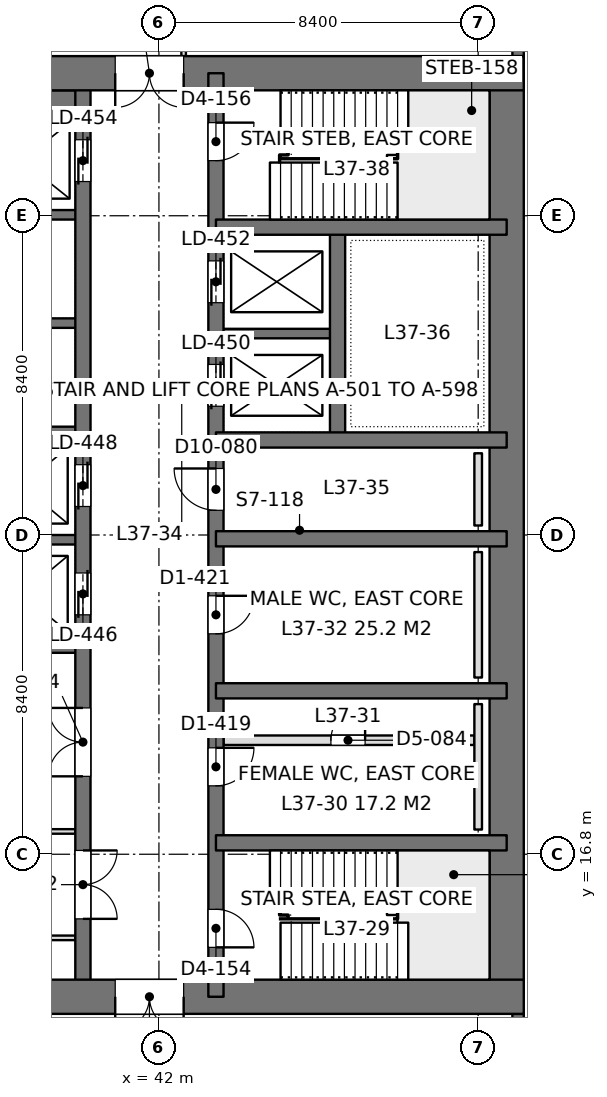
"""IFC4 building model, lengths in metres.
Left out: names, types, materials, properties, quantities, classifications, styles, units other than length and angle.
Written with IfcOpenShell. Run it as: python <this file> out.ifc"""

import sys

from ifc_helpers import new_model, si_unit, direction, frame, frame_2d, origin, place, context, subcontext, project, spatial, rectangle, extrude, element, fill, save


model = new_model("IFC4")
c1 = context("Model", 3, precision=1e-05, world=origin(), true_north=direction((0.0, 1.0)))
c2 = subcontext(c1, "Body", "Model", "MODEL_VIEW")
j1 = project(units=[si_unit("LENGTHUNIT", "METRE"), si_unit("PLANEANGLEUNIT", "RADIAN")], contexts=[c1])
p1 = place(None, origin())
s1 = spatial("IfcSite", under=j1, at=p1, CompositionType="ELEMENT")
p2 = place(p1, origin())
s2 = spatial("IfcBuilding", under=s1, at=p2, CompositionType="ELEMENT")
p3 = place(p2, frame((0.0, 0.0, 163.8)))
s3 = spatial("IfcBuildingStorey", under=s2, at=p3, CompositionType="ELEMENT", Elevation=163.8)
p4 = place(p3, frame((33.6, 13.05, 0.0), z_axis=(0.0, 0.0, 1.0), x_axis=(1.0, 0.0, 0.0)))
e1 = element("IfcWall", 1, at=p4, inside=s3, PredefinedType="SHEAR", context=c2, shape_type="SweptSolid", body=[
    extrude(rectangle(XDim=18.0, YDim=0.9, at=frame_2d((9.0, 0.0))), origin(), (0.0, 0.0, 1.0), 4.2),
])
p5 = place(p4, frame((7.25, 0.0, 0.0)))
e2 = element("IfcOpeningElement", 2, at=p5, cuts=e1, PredefinedType="OPENING", context=c2, shape_type="SweptSolid", body=[
    extrude(rectangle(XDim=1.8, YDim=2.4, at=frame_2d((0.9, 1.2))), frame((0.0, 0.46, 0.0), z_axis=(0.0, -1.0, 0.0), x_axis=(1.0, 0.0, 0.0)), (0.0, 0.0, 1.0), 0.92),
])
p6 = place(p3, frame((33.6, 37.35, 0.0), z_axis=(0.0, 0.0, 1.0), x_axis=(1.0, 0.0, 0.0)))
e3 = element("IfcWall", 3, at=p6, inside=s3, PredefinedType="SHEAR", context=c2, shape_type="SweptSolid", body=[
    extrude(rectangle(XDim=18.0, YDim=0.9, at=frame_2d((9.0, 0.0))), origin(), (0.0, 0.0, 1.0), 4.2),
])
p7 = place(p6, frame((7.25, 0.0, 0.0)))
e4 = element("IfcOpeningElement", 4, at=p7, cuts=e3, PredefinedType="OPENING", context=c2, shape_type="SweptSolid", body=[
    extrude(rectangle(XDim=1.8, YDim=2.4, at=frame_2d((0.9, 1.2))), frame((0.0, 0.46, 0.0), z_axis=(0.0, -1.0, 0.0), x_axis=(1.0, 0.0, 0.0)), (0.0, 0.0, 1.0), 0.92),
])
p8 = place(p3, frame((51.15, 13.05, 0.0), z_axis=(0.0, 0.0, 1.0), x_axis=(0.0, 1.0, 0.0)))
e5 = element("IfcWall", 5, at=p8, inside=s3, PredefinedType="SHEAR", context=c2, shape_type="SweptSolid", body=[
    extrude(rectangle(XDim=24.3, YDim=0.9, at=frame_2d((12.15, 0.0))), origin(), (0.0, 0.0, 1.0), 4.2),
])
p9 = place(p3, frame((43.5, 13.05, 0.0), z_axis=(0.0, 0.0, 1.0), x_axis=(0.0, 1.0, 0.0)))
e6 = element("IfcWall", 6, at=p9, inside=s3, PredefinedType="SHEAR", context=c2, shape_type="SweptSolid", body=[
    extrude(rectangle(XDim=24.3, YDim=0.4, at=frame_2d((12.15, 0.0))), origin(), (0.0, 0.0, 1.0), 4.2),
])
p10 = place(p9, frame((1.3, 0.0, 0.0)))
e7 = element("IfcOpeningElement", 7, at=p10, cuts=e6, PredefinedType="OPENING", context=c2, shape_type="SweptSolid", body=[
    extrude(rectangle(XDim=1.0, YDim=2.2, at=frame_2d((0.5, 1.1))), frame((0.0, 0.21, 0.0), z_axis=(0.0, -1.0, 0.0), x_axis=(1.0, 0.0, 0.0)), (0.0, 0.0, 1.0), 0.42),
])
p11 = place(p9, frame((22.0, 0.0, 0.0)))
e8 = element("IfcOpeningElement", 8, at=p11, cuts=e6, PredefinedType="OPENING", context=c2, shape_type="SweptSolid", body=[
    extrude(rectangle(XDim=1.0, YDim=2.2, at=frame_2d((0.5, 1.1))), frame((0.0, 0.21, 0.0), z_axis=(0.0, -1.0, 0.0), x_axis=(1.0, 0.0, 0.0)), (0.0, 0.0, 1.0), 0.42),
])
p12 = place(p9, frame((5.55, 0.0, 0.0)))
e9 = element("IfcOpeningElement", 9, at=p12, cuts=e6, PredefinedType="OPENING", context=c2, shape_type="SweptSolid", body=[
    extrude(rectangle(XDim=1.0, YDim=2.2, at=frame_2d((0.5, 1.1))), frame((0.0, 0.21, 0.0), z_axis=(0.0, -1.0, 0.0), x_axis=(1.0, 0.0, 0.0)), (0.0, 0.0, 1.0), 0.42),
])
p13 = place(p9, frame((9.55, 0.0, 0.0)))
e10 = element("IfcOpeningElement", 10, at=p13, cuts=e6, PredefinedType="OPENING", context=c2, shape_type="SweptSolid", body=[
    extrude(rectangle(XDim=1.0, YDim=2.2, at=frame_2d((0.5, 1.1))), frame((0.0, 0.21, 0.0), z_axis=(0.0, -1.0, 0.0), x_axis=(1.0, 0.0, 0.0)), (0.0, 0.0, 1.0), 0.42),
])
p14 = place(p9, frame((12.8, 0.0, 0.0)))
e11 = element("IfcOpeningElement", 11, at=p14, cuts=e6, PredefinedType="OPENING", context=c2, shape_type="SweptSolid", body=[
    extrude(rectangle(XDim=1.1, YDim=2.2, at=frame_2d((0.55, 1.1))), frame((0.0, 0.21, 0.0), z_axis=(0.0, -1.0, 0.0), x_axis=(1.0, 0.0, 0.0)), (0.0, 0.0, 1.0), 0.42),
])
p15 = place(p9, frame((15.538, 0.0, 0.0)))
e12 = element("IfcOpeningElement", 12, at=p15, cuts=e6, PredefinedType="OPENING", context=c2, shape_type="SweptSolid", body=[
    extrude(rectangle(XDim=1.1, YDim=2.2, at=frame_2d((0.55, 1.1))), frame((0.0, 0.21, 0.0), z_axis=(0.0, -1.0, 0.0), x_axis=(1.0, 0.0, 0.0)), (0.0, 0.0, 1.0), 0.42),
])
p16 = place(p9, frame((18.262, 0.0, 0.0)))
e13 = element("IfcOpeningElement", 13, at=p16, cuts=e6, PredefinedType="OPENING", context=c2, shape_type="SweptSolid", body=[
    extrude(rectangle(XDim=1.1, YDim=2.2, at=frame_2d((0.55, 1.1))), frame((0.0, 0.21, 0.0), z_axis=(0.0, -1.0, 0.0), x_axis=(1.0, 0.0, 0.0)), (0.0, 0.0, 1.0), 0.42),
])
p17 = place(p3, frame((40.0, 13.05, 0.0), z_axis=(0.0, 0.0, 1.0), x_axis=(0.0, 1.0, 0.0)))
e14 = element("IfcWall", 14, at=p17, inside=s3, PredefinedType="SHEAR", context=c2, shape_type="SweptSolid", body=[
    extrude(rectangle(XDim=24.3, YDim=0.4, at=frame_2d((12.15, 0.0))), origin(), (0.0, 0.0, 1.0), 4.2),
])
p18 = place(p17, frame((10.05, 0.0, 0.0)))
e15 = element("IfcOpeningElement", 15, at=p18, cuts=e14, PredefinedType="OPENING", context=c2, shape_type="SweptSolid", body=[
    extrude(rectangle(XDim=1.1, YDim=2.2, at=frame_2d((0.55, 1.1))), frame((0.0, 0.21, 0.0), z_axis=(0.0, -1.0, 0.0), x_axis=(1.0, 0.0, 0.0)), (0.0, 0.0, 1.0), 0.42),
])
p19 = place(p17, frame((12.9, 0.0, 0.0)))
e16 = element("IfcOpeningElement", 16, at=p19, cuts=e14, PredefinedType="OPENING", context=c2, shape_type="SweptSolid", body=[
    extrude(rectangle(XDim=1.1, YDim=2.2, at=frame_2d((0.55, 1.1))), frame((0.0, 0.21, 0.0), z_axis=(0.0, -1.0, 0.0), x_axis=(1.0, 0.0, 0.0)), (0.0, 0.0, 1.0), 0.42),
])
p20 = place(p17, frame((21.45, 0.0, 0.0)))
e17 = element("IfcOpeningElement", 17, at=p20, cuts=e14, PredefinedType="OPENING", context=c2, shape_type="SweptSolid", body=[
    extrude(rectangle(XDim=1.1, YDim=2.2, at=frame_2d((0.55, 1.1))), frame((0.0, 0.21, 0.0), z_axis=(0.0, -1.0, 0.0), x_axis=(1.0, 0.0, 0.0)), (0.0, 0.0, 1.0), 0.42),
])
p21 = place(p17, frame((2.05, 0.0, 0.0)))
e18 = element("IfcOpeningElement", 18, at=p21, cuts=e14, PredefinedType="OPENING", context=c2, shape_type="SweptSolid", body=[
    extrude(rectangle(XDim=1.8, YDim=2.4, at=frame_2d((0.9, 1.2))), frame((0.0, 0.21, 0.0), z_axis=(0.0, -1.0, 0.0), x_axis=(1.0, 0.0, 0.0)), (0.0, 0.0, 1.0), 0.42),
])
p22 = place(p17, frame((5.8, 0.0, 0.0)))
e19 = element("IfcOpeningElement", 19, at=p22, cuts=e14, PredefinedType="OPENING", context=c2, shape_type="SweptSolid", body=[
    extrude(rectangle(XDim=1.8, YDim=2.4, at=frame_2d((0.9, 1.2))), frame((0.0, 0.21, 0.0), z_axis=(0.0, -1.0, 0.0), x_axis=(1.0, 0.0, 0.0)), (0.0, 0.0, 1.0), 0.42),
])
for number, where, z_axis, x_axis in (
    (20, (51.15, 17.1, 0.0), (0.0, 0.0, 1.0), (-1.0, 0.0, 0.0)),
    (21, (51.15, 21.1, 0.0), (0.0, 0.0, 1.0), (-1.0, 0.0, 0.0)),
    (22, (51.15, 25.1, 0.0), (0.0, 0.0, 1.0), (-1.0, 0.0, 0.0)),
    (23, (51.15, 27.7, 0.0), (0.0, 0.0, 1.0), (-1.0, 0.0, 0.0)),
    (24, (51.15, 33.3, 0.0), (0.0, 0.0, 1.0), (-1.0, 0.0, 0.0)),
):
    element("IfcWall", number, at=place(p3, frame(where, z_axis=z_axis, x_axis=x_axis)), inside=s3, PredefinedType="SHEAR", context=c2, shape_type="SweptSolid", body=[
        extrude(rectangle(XDim=7.65, YDim=0.4, at=frame_2d((3.825, 0.0))), origin(), (0.0, 0.0, 1.0), 4.2),
    ])
p23 = place(p3, frame((46.7, 27.7, 0.0), z_axis=(0.0, 0.0, 1.0), x_axis=(0.0, 1.0, 0.0)))
e25 = element("IfcWall", 25, at=p23, inside=s3, PredefinedType="SHEAR", context=c2, shape_type="SweptSolid", body=[
    extrude(rectangle(XDim=5.6, YDim=0.4, at=frame_2d((2.8, 0.0))), origin(), (0.0, 0.0, 1.0), 4.2),
])
p24 = place(p3, frame((46.7, 30.5, 0.0), z_axis=(0.0, 0.0, 1.0), x_axis=(-1.0, 0.0, 0.0)))
e26 = element("IfcWall", 26, at=p24, inside=s3, PredefinedType="SHEAR", context=c2, shape_type="SweptSolid", body=[
    extrude(rectangle(XDim=3.2, YDim=0.25, at=frame_2d((1.6, 0.0))), origin(), (0.0, 0.0, 1.0), 4.2),
])
p25 = place(p3, frame((40.0, 22.225, 0.0), z_axis=(0.0, 0.0, 1.0), x_axis=(-1.0, 0.0, 0.0)))
e27 = element("IfcWall", 27, at=p25, inside=s3, PredefinedType="SHEAR", context=c2, shape_type="SweptSolid", body=[
    extrude(rectangle(XDim=5.95, YDim=0.25, at=frame_2d((2.975, 0.0))), origin(), (0.0, 0.0, 1.0), 4.2),
])
for number, where, z_axis, x_axis in (
    (28, (40.0, 25.075, 0.0), (0.0, 0.0, 1.0), (-1.0, 0.0, 0.0)),
    (29, (40.0, 27.925, 0.0), (0.0, 0.0, 1.0), (-1.0, 0.0, 0.0)),
    (30, (40.0, 30.775, 0.0), (0.0, 0.0, 1.0), (-1.0, 0.0, 0.0)),
    (31, (40.0, 33.625, 0.0), (0.0, 0.0, 1.0), (-1.0, 0.0, 0.0)),
):
    element("IfcWall", number, at=place(p3, frame(where, z_axis=z_axis, x_axis=x_axis)), inside=s3, PredefinedType="SHEAR", context=c2, shape_type="SweptSolid", body=[
        extrude(rectangle(XDim=3.2, YDim=0.25, at=frame_2d((1.6, 0.0))), origin(), (0.0, 0.0, 1.0), 4.2),
    ])
p26 = place(p3, frame((40.0, 36.625, 0.0), z_axis=(0.0, 0.0, 1.0), x_axis=(-1.0, 0.0, 0.0)))
e32 = element("IfcWall", 32, at=p26, inside=s3, PredefinedType="SHEAR", context=c2, shape_type="SweptSolid", body=[
    extrude(rectangle(XDim=3.2, YDim=0.55, at=frame_2d((1.6, 0.0))), origin(), (0.0, 0.0, 1.0), 4.2),
])
p27 = place(p3, frame((51.45, 42.0, 0.0), z_axis=(0.0, 0.0, 1.0), x_axis=(0.0, -1.0, 0.0)))
e33 = element("IfcWall", 33, at=p27, inside=s3, PredefinedType="SOLIDWALL", context=c2, shape_type="SweptSolid", body=[
    extrude(rectangle(XDim=4.2, YDim=0.3, at=frame_2d((2.1, 0.0))), origin(), (0.0, 0.0, 1.0), 4.0),
])
p28 = place(p27, frame((0.9, 0.0, 0.9)))
e34 = element("IfcOpeningElement", 34, at=p28, cuts=e33, PredefinedType="OPENING", context=c2, shape_type="SweptSolid", body=[
    extrude(rectangle(XDim=2.4, YDim=1.9, at=frame_2d((1.2, 0.95))), frame((0.0, 0.16, 0.0), z_axis=(0.0, -1.0, 0.0), x_axis=(1.0, 0.0, 0.0)), (0.0, 0.0, 1.0), 0.32),
])
p29 = place(p3, frame((51.45, 12.6, 0.0), z_axis=(0.0, 0.0, 1.0), x_axis=(0.0, -1.0, 0.0)))
e35 = element("IfcWall", 35, at=p29, inside=s3, PredefinedType="SOLIDWALL", context=c2, shape_type="SweptSolid", body=[
    extrude(rectangle(XDim=4.2, YDim=0.3, at=frame_2d((2.1, 0.0))), origin(), (0.0, 0.0, 1.0), 4.0),
])
p30 = place(p29, frame((0.9, 0.0, 0.9)))
e36 = element("IfcOpeningElement", 36, at=p30, cuts=e35, PredefinedType="OPENING", context=c2, shape_type="SweptSolid", body=[
    extrude(rectangle(XDim=2.4, YDim=1.9, at=frame_2d((1.2, 0.95))), frame((0.0, 0.16, 0.0), z_axis=(0.0, -1.0, 0.0), x_axis=(1.0, 0.0, 0.0)), (0.0, 0.0, 1.0), 0.32),
])
p31 = place(p3, frame((33.898, 17.4, 0.0), z_axis=(0.0, 0.0, 1.0), x_axis=(1.0, 0.0, 0.0)))
e37 = element("IfcWall", 37, at=p31, inside=s3, PredefinedType="PARTITIONING", context=c2, shape_type="SweptSolid", body=[
    extrude(rectangle(XDim=5.904, YDim=0.12, at=frame_2d((2.952, 0.0))), origin(), (0.0, 0.0, 1.0), 3.3),
])
p32 = place(p31, frame((0.752, 0.0, 0.0)))
e38 = element("IfcOpeningElement", 38, at=p32, cuts=e37, PredefinedType="OPENING", context=c2, shape_type="SweptSolid", body=[
    extrude(rectangle(XDim=1.0, YDim=2.4, at=frame_2d((0.5, 1.2))), frame((0.0, 0.07, 0.0), z_axis=(0.0, -1.0, 0.0), x_axis=(1.0, 0.0, 0.0)), (0.0, 0.0, 1.0), 0.14),
])
p33 = place(p3, frame((33.598, 14.6, 0.0), z_axis=(0.0, 0.0, 1.0), x_axis=(1.0, 0.0, 0.0)))
e39 = element("IfcWall", 39, at=p33, inside=s3, PredefinedType="PARTITIONING", context=c2, shape_type="SweptSolid", body=[
    extrude(rectangle(XDim=6.204, YDim=0.12, at=frame_2d((3.102, 0.0))), origin(), (0.0, 0.0, 1.0), 3.3),
])
p34 = place(p3, frame((42.65, 37.8, 0.0), z_axis=(0.0, 0.0, 1.0), x_axis=(0.0, 1.0, 0.0)))
e40 = element("IfcWall", 40, at=p34, inside=s3, PredefinedType="PARTITIONING", context=c2, shape_type="SweptSolid", body=[
    extrude(rectangle(XDim=2.0, YDim=0.12, at=frame_2d((1.0, 0.0))), origin(), (0.0, 0.0, 1.0), 4.0),
])
p35 = place(p3, frame((43.7, 19.8, 0.0), z_axis=(0.0, 0.0, 1.0), x_axis=(1.0, 0.0, 0.0)))
e41 = element("IfcWall", 41, at=p35, inside=s3, PredefinedType="PARTITIONING", context=c2, shape_type="SweptSolid", body=[
    extrude(rectangle(XDim=6.6, YDim=0.25, at=frame_2d((3.3, 0.0))), origin(), (0.0, 0.0, 1.0), 4.0),
])
p36 = place(p35, frame((2.825, 0.0, 0.0)))
e42 = element("IfcOpeningElement", 42, at=p36, cuts=e41, PredefinedType="OPENING", context=c2, shape_type="SweptSolid", body=[
    extrude(rectangle(XDim=0.9, YDim=2.2, at=frame_2d((0.45, 1.1))), frame((0.0, 0.135, 0.0), z_axis=(0.0, -1.0, 0.0), x_axis=(1.0, 0.0, 0.0)), (0.0, 0.0, 1.0), 0.27),
])
for number, where, z_axis, x_axis in (
    (43, (50.4, 17.45, 0.0), (0.0, 0.0, 1.0), (0.0, 1.0, 0.0)),
    (44, (50.4, 21.45, 0.0), (0.0, 0.0, 1.0), (0.0, 1.0, 0.0)),
):
    element("IfcWall", number, at=place(p3, frame(where, z_axis=z_axis, x_axis=x_axis)), inside=s3, PredefinedType="PLUMBINGWALL", context=c2, shape_type="SweptSolid", body=[
        extrude(rectangle(XDim=3.3, YDim=0.2, at=frame_2d((1.65, 0.0))), origin(), (0.0, 0.0, 1.0), 1.2),
    ])
p37 = place(p3, frame((50.4, 25.45, 0.0), z_axis=(0.0, 0.0, 1.0), x_axis=(0.0, 1.0, 0.0)))
e45 = element("IfcWall", 45, at=p37, inside=s3, PredefinedType="PLUMBINGWALL", context=c2, shape_type="SweptSolid", body=[
    extrude(rectangle(XDim=1.9, YDim=0.2, at=frame_2d((0.95, 0.0))), origin(), (0.0, 0.0, 1.0), 1.2),
])
p38 = place(p5, frame((1.8, 0.0, 0.0), z_axis=(0.0, 0.0, 1.0), x_axis=(-1.0, 0.0, 0.0)))
e46 = element("IfcDoor", 46, at=p38, inside=s3, OperationType="DOUBLE_DOOR_SINGLE_SWING", PredefinedType="DOOR", context=c2, shape_type="SweptSolid", body=[
    extrude(rectangle(XDim=1.8, YDim=2.4, at=frame_2d((0.9, 1.2))), frame((0.0, 0.025, 0.0), z_axis=(0.0, -1.0, 0.0), x_axis=(1.0, 0.0, 0.0)), (0.0, 0.0, 1.0), 0.05),
])
fill(e2, e46)
p39 = place(p7, frame((1.8, 0.0, 0.0), z_axis=(0.0, 0.0, 1.0), x_axis=(-1.0, 0.0, 0.0)))
e47 = element("IfcDoor", 47, at=p39, inside=s3, OperationType="DOUBLE_DOOR_SINGLE_SWING", PredefinedType="DOOR", context=c2, shape_type="SweptSolid", body=[
    extrude(rectangle(XDim=1.8, YDim=2.4, at=frame_2d((0.9, 1.2))), frame((0.0, 0.025, 0.0), z_axis=(0.0, -1.0, 0.0), x_axis=(1.0, 0.0, 0.0)), (0.0, 0.0, 1.0), 0.05),
])
fill(e4, e47)
p40 = place(p10, frame((1.0, 0.0, 0.0), z_axis=(0.0, 0.0, 1.0), x_axis=(-1.0, 0.0, 0.0)))
e48 = element("IfcDoor", 48, at=p40, inside=s3, OperationType="SINGLE_SWING_RIGHT", PredefinedType="DOOR", context=c2, shape_type="SweptSolid", body=[
    extrude(rectangle(XDim=1.0, YDim=2.2, at=frame_2d((0.5, 1.1))), frame((0.0, 0.025, 0.0), z_axis=(0.0, -1.0, 0.0), x_axis=(1.0, 0.0, 0.0)), (0.0, 0.0, 1.0), 0.05),
])
fill(e7, e48)
p41 = place(p11, frame((1.0, 0.0, 0.0), z_axis=(0.0, 0.0, 1.0), x_axis=(-1.0, 0.0, 0.0)))
e49 = element("IfcDoor", 49, at=p41, inside=s3, OperationType="SINGLE_SWING_LEFT", PredefinedType="DOOR", context=c2, shape_type="SweptSolid", body=[
    extrude(rectangle(XDim=1.0, YDim=2.2, at=frame_2d((0.5, 1.1))), frame((0.0, 0.025, 0.0), z_axis=(0.0, -1.0, 0.0), x_axis=(1.0, 0.0, 0.0)), (0.0, 0.0, 1.0), 0.05),
])
fill(e8, e49)
p42 = place(p12, frame((1.0, 0.0, 0.0), z_axis=(0.0, 0.0, 1.0), x_axis=(-1.0, 0.0, 0.0)))
e50 = element("IfcDoor", 50, at=p42, inside=s3, OperationType="SINGLE_SWING_LEFT", PredefinedType="DOOR", context=c2, shape_type="SweptSolid", body=[
    extrude(rectangle(XDim=1.0, YDim=2.2, at=frame_2d((0.5, 1.1))), frame((0.0, 0.025, 0.0), z_axis=(0.0, -1.0, 0.0), x_axis=(1.0, 0.0, 0.0)), (0.0, 0.0, 1.0), 0.05),
])
fill(e9, e50)
p43 = place(p13, frame((1.0, 0.0, 0.0), z_axis=(0.0, 0.0, 1.0), x_axis=(-1.0, 0.0, 0.0)))
e51 = element("IfcDoor", 51, at=p43, inside=s3, OperationType="SINGLE_SWING_LEFT", PredefinedType="DOOR", context=c2, shape_type="SweptSolid", body=[
    extrude(rectangle(XDim=1.0, YDim=2.2, at=frame_2d((0.5, 1.1))), frame((0.0, 0.025, 0.0), z_axis=(0.0, -1.0, 0.0), x_axis=(1.0, 0.0, 0.0)), (0.0, 0.0, 1.0), 0.05),
])
fill(e10, e51)
p44 = place(p14, origin())
e52 = element("IfcDoor", 52, at=p44, inside=s3, OperationType="SINGLE_SWING_RIGHT", PredefinedType="DOOR", context=c2, shape_type="SweptSolid", body=[
    extrude(rectangle(XDim=1.1, YDim=2.2, at=frame_2d((0.55, 1.1))), frame((0.0, 0.025, 0.0), z_axis=(0.0, -1.0, 0.0), x_axis=(1.0, 0.0, 0.0)), (0.0, 0.0, 1.0), 0.05),
])
fill(e11, e52)
p45 = place(p18, origin())
e53 = element("IfcDoor", 53, at=p45, inside=s3, OperationType="DOUBLE_DOOR_SLIDING", PredefinedType="DOOR", context=c2, shape_type="SweptSolid", body=[
    extrude(rectangle(XDim=1.1, YDim=2.2, at=frame_2d((0.55, 1.1))), frame((0.0, 0.025, 0.0), z_axis=(0.0, -1.0, 0.0), x_axis=(1.0, 0.0, 0.0)), (0.0, 0.0, 1.0), 0.05),
])
fill(e15, e53)
p46 = place(p19, origin())
e54 = element("IfcDoor", 54, at=p46, inside=s3, OperationType="DOUBLE_DOOR_SLIDING", PredefinedType="DOOR", context=c2, shape_type="SweptSolid", body=[
    extrude(rectangle(XDim=1.1, YDim=2.2, at=frame_2d((0.55, 1.1))), frame((0.0, 0.025, 0.0), z_axis=(0.0, -1.0, 0.0), x_axis=(1.0, 0.0, 0.0)), (0.0, 0.0, 1.0), 0.05),
])
fill(e16, e54)
p47 = place(p20, origin())
e55 = element("IfcDoor", 55, at=p47, inside=s3, OperationType="DOUBLE_DOOR_SLIDING", PredefinedType="DOOR", context=c2, shape_type="SweptSolid", body=[
    extrude(rectangle(XDim=1.1, YDim=2.2, at=frame_2d((0.55, 1.1))), frame((0.0, 0.025, 0.0), z_axis=(0.0, -1.0, 0.0), x_axis=(1.0, 0.0, 0.0)), (0.0, 0.0, 1.0), 0.05),
])
fill(e17, e55)
p48 = place(p15, origin())
e56 = element("IfcDoor", 56, at=p48, inside=s3, OperationType="DOUBLE_DOOR_SLIDING", PredefinedType="DOOR", context=c2, shape_type="SweptSolid", body=[
    extrude(rectangle(XDim=1.1, YDim=2.2, at=frame_2d((0.55, 1.1))), frame((0.0, 0.025, 0.0), z_axis=(0.0, -1.0, 0.0), x_axis=(1.0, 0.0, 0.0)), (0.0, 0.0, 1.0), 0.05),
])
fill(e12, e56)
p49 = place(p16, origin())
e57 = element("IfcDoor", 57, at=p49, inside=s3, OperationType="DOUBLE_DOOR_SLIDING", PredefinedType="DOOR", context=c2, shape_type="SweptSolid", body=[
    extrude(rectangle(XDim=1.1, YDim=2.2, at=frame_2d((0.55, 1.1))), frame((0.0, 0.025, 0.0), z_axis=(0.0, -1.0, 0.0), x_axis=(1.0, 0.0, 0.0)), (0.0, 0.0, 1.0), 0.05),
])
fill(e13, e57)
p50 = place(p21, frame((1.8, 0.0, 0.0), z_axis=(0.0, 0.0, 1.0), x_axis=(-1.0, 0.0, 0.0)))
e58 = element("IfcDoor", 58, at=p50, inside=s3, OperationType="DOUBLE_DOOR_SINGLE_SWING", PredefinedType="DOOR", context=c2, shape_type="SweptSolid", body=[
    extrude(rectangle(XDim=1.8, YDim=2.4, at=frame_2d((0.9, 1.2))), frame((0.0, 0.025, 0.0), z_axis=(0.0, -1.0, 0.0), x_axis=(1.0, 0.0, 0.0)), (0.0, 0.0, 1.0), 0.05),
])
fill(e18, e58)
p51 = place(p22, origin())
e59 = element("IfcDoor", 59, at=p51, inside=s3, OperationType="DOUBLE_DOOR_SINGLE_SWING", PredefinedType="DOOR", context=c2, shape_type="SweptSolid", body=[
    extrude(rectangle(XDim=1.8, YDim=2.4, at=frame_2d((0.9, 1.2))), frame((0.0, 0.025, 0.0), z_axis=(0.0, -1.0, 0.0), x_axis=(1.0, 0.0, 0.0)), (0.0, 0.0, 1.0), 0.05),
])
fill(e19, e59)
p52 = place(p36, origin())
e60 = element("IfcDoor", 60, at=p52, inside=s3, OperationType="SINGLE_SWING_RIGHT", PredefinedType="DOOR", context=c2, shape_type="SweptSolid", body=[
    extrude(rectangle(XDim=0.9, YDim=2.2, at=frame_2d((0.45, 1.1))), frame((0.0, 0.025, 0.0), z_axis=(0.0, -1.0, 0.0), x_axis=(1.0, 0.0, 0.0)), (0.0, 0.0, 1.0), 0.05),
])
fill(e42, e60)
save(model, sys.argv[1])
